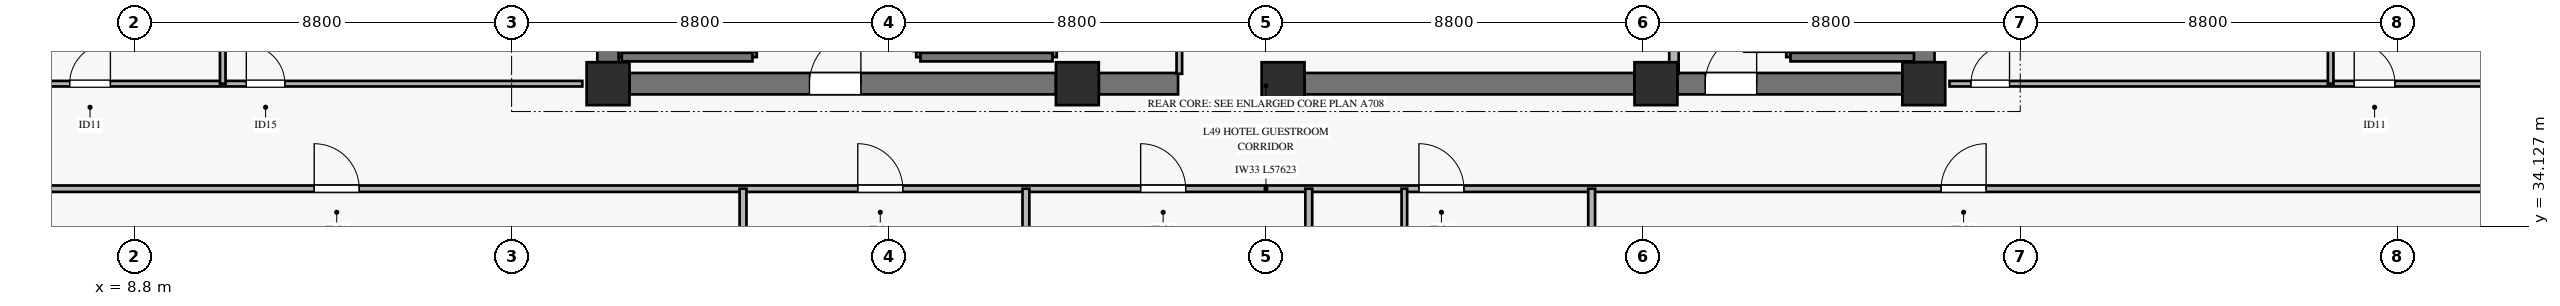
"""IFC4 building model, lengths in metres.
Left out: names, types, materials, properties, quantities, classifications, styles, units other than length and angle.
Written with IfcOpenShell. Run it as: python <this file> out.ifc"""

import sys

from ifc_helpers import new_model, si_unit, direction, frame, frame_2d, origin, origin_2d, place, context, subcontext, project, spatial, rectangle, extrude, source, transform, mapped, element, fill, save


model = new_model("IFC4")
c1 = context("Model", 3, precision=1e-05, world=origin(), true_north=direction((0.0, 1.0)))
c2 = subcontext(c1, "Body", "Model", "MODEL_VIEW")
j1 = project(units=[si_unit("LENGTHUNIT", "METRE"), si_unit("PLANEANGLEUNIT", "RADIAN")], contexts=[c1])
p1 = place(None, origin())
s1 = spatial("IfcSite", under=j1, at=p1, CompositionType="ELEMENT")
p2 = place(p1, origin())
s2 = spatial("IfcBuilding", under=s1, at=p2, CompositionType="ELEMENT")
p3 = place(p2, frame((0.0, 0.0, 195.7)))
s3 = spatial("IfcBuildingStorey", under=s2, at=p3, CompositionType="ELEMENT", Elevation=195.7)
m1 = source(origin(), c2, "Body", "SweptSolid", [
    extrude(rectangle(XDim=1.0, YDim=1.0, at=origin_2d()), origin(), (0.0, 0.0, 1.0), 3.27),
])
for number, where, z_axis, x_axis in (
    (1, (19.85, 37.45, 0.0), (0.0, 0.0, 1.0), (1.0, 0.0, 0.0)),
    (2, (30.8, 37.45, 0.0), (0.0, 0.0, 1.0), (1.0, 0.0, 0.0)),
    (3, (35.6, 37.45, 0.0), (0.0, 0.0, 1.0), (1.0, 0.0, 0.0)),
    (4, (44.3, 37.45, 0.0), (0.0, 0.0, 1.0), (1.0, 0.0, 0.0)),
    (5, (50.55, 37.45, 0.0), (0.0, 0.0, 1.0), (1.0, 0.0, 0.0)),
):
    element("IfcColumn", number, at=place(p3, frame(where, z_axis=z_axis, x_axis=x_axis)), inside=s3, PredefinedType="PILASTER", context=c2, shape_type="MappedRepresentation", body=[
        mapped(m1, transform((0.0, 0.0, 0.0), x_axis=(1.0, 0.0, 0.0), y_axis=(0.0, 1.0, 0.0), z_axis=(0.0, 0.0, 1.0), scale=1.0)),
    ])
p4 = place(p3, frame((20.35, 37.45, 0.0), z_axis=(0.0, 0.0, 1.0), x_axis=(1.0, 0.0, 0.0)))
e6 = element("IfcWall", 6, at=p4, inside=s3, PredefinedType="SHEAR", context=c2, shape_type="SweptSolid", body=[
    extrude(rectangle(XDim=9.95, YDim=0.5, at=frame_2d((4.975, 0.0))), origin(), (0.0, 0.0, 1.0), 3.27),
])
p5 = place(p4, frame((4.2, 0.0, 0.0)))
e7 = element("IfcOpeningElement", 7, at=p5, cuts=e6, PredefinedType="OPENING", context=c2, shape_type="SweptSolid", body=[
    extrude(rectangle(XDim=1.2, YDim=2.15, at=frame_2d((0.6, 1.075))), frame((0.0, 0.26, 0.0), z_axis=(0.0, -1.0, 0.0), x_axis=(1.0, 0.0, 0.0)), (0.0, 0.0, 1.0), 0.52),
])
p6 = place(p3, frame((31.3, 37.45, 0.0), z_axis=(0.0, 0.0, 1.0), x_axis=(1.0, 0.0, 0.0)))
e8 = element("IfcWall", 8, at=p6, inside=s3, PredefinedType="SHEAR", context=c2, shape_type="SweptSolid", body=[
    extrude(rectangle(XDim=1.85, YDim=0.5, at=frame_2d((0.925, 0.0))), origin(), (0.0, 0.0, 1.0), 3.27),
])
p7 = place(p3, frame((36.1, 37.45, 0.0), z_axis=(0.0, 0.0, 1.0), x_axis=(1.0, 0.0, 0.0)))
e9 = element("IfcWall", 9, at=p7, inside=s3, PredefinedType="SHEAR", context=c2, shape_type="SweptSolid", body=[
    extrude(rectangle(XDim=7.7, YDim=0.5, at=frame_2d((3.85, 0.0))), origin(), (0.0, 0.0, 1.0), 3.27),
])
p8 = place(p3, frame((44.8, 37.45, 0.0), z_axis=(0.0, 0.0, 1.0), x_axis=(1.0, 0.0, 0.0)))
e10 = element("IfcWall", 10, at=p8, inside=s3, PredefinedType="SHEAR", context=c2, shape_type="SweptSolid", body=[
    extrude(rectangle(XDim=5.25, YDim=0.5, at=frame_2d((2.625, 0.0))), origin(), (0.0, 0.0, 1.0), 3.27),
])
p9 = place(p8, frame((0.65, 0.0, 0.0)))
e11 = element("IfcOpeningElement", 11, at=p9, cuts=e10, PredefinedType="OPENING", context=c2, shape_type="SweptSolid", body=[
    extrude(rectangle(XDim=1.2, YDim=2.15, at=frame_2d((0.6, 1.075))), frame((0.0, 0.26, 0.0), z_axis=(0.0, -1.0, 0.0), x_axis=(1.0, 0.0, 0.0)), (0.0, 0.0, 1.0), 0.52),
])
for number, where, z_axis, x_axis in (
    (12, (19.85, 37.95, 0.0), (0.0, 0.0, 1.0), (0.0, 1.0, 0.0)),
    (13, (50.55, 37.95, 0.0), (0.0, 0.0, 1.0), (0.0, 1.0, 0.0)),
):
    element("IfcWall", number, at=place(p3, frame(where, z_axis=z_axis, x_axis=x_axis)), inside=s3, PredefinedType="SHEAR", context=c2, shape_type="SweptSolid", body=[
        extrude(rectangle(XDim=8.1, YDim=0.5, at=frame_2d((4.05, 0.0))), origin(), (0.0, 0.0, 1.0), 3.27),
    ])
p10 = place(p3, frame((20.17, 38.07, 0.0), z_axis=(0.0, 0.0, 1.0), x_axis=(0.0, 1.0, 0.0)))
e14 = element("IfcWall", 14, at=p10, inside=s3, PredefinedType="SOLIDWALL", context=c2, shape_type="SweptSolid", body=[
    extrude(rectangle(XDim=7.25, YDim=0.14, at=frame_2d((3.625, 0.0))), origin(), (0.0, 0.0, 1.0), 3.5),
])
p11 = place(p3, frame((23.22, 38.07, 0.0), z_axis=(0.0, 0.0, 1.0), x_axis=(0.0, 1.0, 0.0)))
e15 = element("IfcWall", 15, at=p11, inside=s3, PredefinedType="SOLIDWALL", context=c2, shape_type="SweptSolid", body=[
    extrude(rectangle(XDim=7.25, YDim=0.2, at=frame_2d((3.625, 0.0))), origin(), (0.0, 0.0, 1.0), 3.5),
])
p12 = place(p11, frame((0.11, 0.0, 0.0)))
e16 = element("IfcOpeningElement", 16, at=p12, cuts=e15, PredefinedType="OPENING", context=c2, shape_type="SweptSolid", body=[
    extrude(rectangle(XDim=1.1, YDim=2.15, at=frame_2d((0.55, 1.075))), frame((0.0, 0.11, 0.0), z_axis=(0.0, -1.0, 0.0), x_axis=(1.0, 0.0, 0.0)), (0.0, 0.0, 1.0), 0.22),
])
p13 = place(p3, frame((20.17, 38.07, 0.0), z_axis=(0.0, 0.0, 1.0), x_axis=(1.0, 0.0, 0.0)))
e17 = element("IfcWall", 17, at=p13, inside=s3, PredefinedType="SOLIDWALL", context=c2, shape_type="SweptSolid", body=[
    extrude(rectangle(XDim=3.05, YDim=0.2, at=frame_2d((1.525, 0.0))), origin(), (0.0, 0.0, 1.0), 3.5),
])
p14 = place(p3, frame((27.14, 38.07, 0.0), z_axis=(0.0, 0.0, 1.0), x_axis=(0.0, 1.0, 0.0)))
e18 = element("IfcWall", 18, at=p14, inside=s3, PredefinedType="SOLIDWALL", context=c2, shape_type="SweptSolid", body=[
    extrude(rectangle(XDim=7.25, YDim=0.2, at=frame_2d((3.625, 0.0))), origin(), (0.0, 0.0, 1.0), 3.5),
])
p15 = place(p14, frame((0.11, 0.0, 0.0)))
e19 = element("IfcOpeningElement", 19, at=p15, cuts=e18, PredefinedType="OPENING", context=c2, shape_type="SweptSolid", body=[
    extrude(rectangle(XDim=1.1, YDim=2.15, at=frame_2d((0.55, 1.075))), frame((0.0, 0.11, 0.0), z_axis=(0.0, -1.0, 0.0), x_axis=(1.0, 0.0, 0.0)), (0.0, 0.0, 1.0), 0.22),
])
p16 = place(p3, frame((30.22, 38.07, 0.0), z_axis=(0.0, 0.0, 1.0), x_axis=(0.0, 1.0, 0.0)))
e20 = element("IfcWall", 20, at=p16, inside=s3, PredefinedType="SOLIDWALL", context=c2, shape_type="SweptSolid", body=[
    extrude(rectangle(XDim=7.25, YDim=0.2, at=frame_2d((3.625, 0.0))), origin(), (0.0, 0.0, 1.0), 3.5),
])
p17 = place(p3, frame((27.14, 38.07, 0.0), z_axis=(0.0, 0.0, 1.0), x_axis=(1.0, 0.0, 0.0)))
e21 = element("IfcWall", 21, at=p17, inside=s3, PredefinedType="SOLIDWALL", context=c2, shape_type="SweptSolid", body=[
    extrude(rectangle(XDim=3.08, YDim=0.2, at=frame_2d((1.54, 0.0))), origin(), (0.0, 0.0, 1.0), 3.5),
])
p18 = place(p3, frame((47.44, 38.07, 0.0), z_axis=(0.0, 0.0, 1.0), x_axis=(0.0, 1.0, 0.0)))
e22 = element("IfcWall", 22, at=p18, inside=s3, PredefinedType="SOLIDWALL", context=c2, shape_type="SweptSolid", body=[
    extrude(rectangle(XDim=7.25, YDim=0.2, at=frame_2d((3.625, 0.0))), origin(), (0.0, 0.0, 1.0), 3.5),
])
p19 = place(p18, frame((0.11, 0.0, 0.0)))
e23 = element("IfcOpeningElement", 23, at=p19, cuts=e22, PredefinedType="OPENING", context=c2, shape_type="SweptSolid", body=[
    extrude(rectangle(XDim=1.1, YDim=2.15, at=frame_2d((0.55, 1.075))), frame((0.0, 0.11, 0.0), z_axis=(0.0, -1.0, 0.0), x_axis=(1.0, 0.0, 0.0)), (0.0, 0.0, 1.0), 0.22),
])
p20 = place(p3, frame((47.44, 38.07, 0.0), z_axis=(0.0, 0.0, 1.0), x_axis=(1.0, 0.0, 0.0)))
e24 = element("IfcWall", 24, at=p20, inside=s3, PredefinedType="SOLIDWALL", context=c2, shape_type="SweptSolid", body=[
    extrude(rectangle(XDim=2.88, YDim=0.2, at=frame_2d((1.44, 0.0))), origin(), (0.0, 0.0, 1.0), 3.5),
])
p21 = place(p3, frame((44.72, 37.68, 0.0), z_axis=(0.0, 0.0, 1.0), x_axis=(0.0, 1.0, 0.0)))
e25 = element("IfcWall", 25, at=p21, inside=s3, PredefinedType="SOLIDWALL", context=c2, shape_type="SweptSolid", body=[
    extrude(rectangle(XDim=7.54, YDim=0.22, at=frame_2d((3.77, 0.0))), origin(), (0.0, 0.0, 1.0), 3.27),
])
p22 = place(p3, frame((33.18, 37.68, 0.0), z_axis=(0.0, 0.0, 1.0), x_axis=(0.0, 1.0, 0.0)))
e26 = element("IfcWall", 26, at=p22, inside=s3, PredefinedType="PARTITIONING", context=c2, shape_type="SweptSolid", body=[
    extrude(rectangle(XDim=6.47, YDim=0.13, at=frame_2d((3.235, 0.0))), origin(), (0.0, 0.0, 1.0), 2.355),
])
p23 = place(p22, frame((2.22, 0.0, 0.0)))
e27 = element("IfcOpeningElement", 27, at=p23, cuts=e26, PredefinedType="OPENING", context=c2, shape_type="SweptSolid", body=[
    extrude(rectangle(XDim=0.9, YDim=2.1, at=frame_2d((0.45, 1.05))), frame((0.0, 0.075, 0.0), z_axis=(0.0, -1.0, 0.0), x_axis=(1.0, 0.0, 0.0)), (0.0, 0.0, 1.0), 0.15),
])
p24 = place(p3, frame((6.389, 35.0, 0.0), z_axis=(0.0, 0.0, 1.0), x_axis=(1.0, 0.0, 0.0)))
e28 = element("IfcWall", 28, at=p24, inside=s3, PredefinedType="PARTITIONING", context=c2, shape_type="SweptSolid", body=[
    extrude(rectangle(XDim=57.623, YDim=0.15, at=frame_2d((28.812, 0.0))), origin(), (0.0, 0.0, 1.0), 2.455),
])
p25 = place(p24, frame((6.605, 0.0, 0.0)))
e29 = element("IfcOpeningElement", 29, at=p25, cuts=e28, PredefinedType="OPENING", context=c2, shape_type="SweptSolid", body=[
    extrude(rectangle(XDim=1.05, YDim=2.15, at=frame_2d((0.525, 1.075))), frame((0.0, 0.085, 0.0), z_axis=(0.0, -1.0, 0.0), x_axis=(1.0, 0.0, 0.0)), (0.0, 0.0, 1.0), 0.17),
])
p26 = place(p24, frame((19.288, 0.0, 0.0)))
e30 = element("IfcOpeningElement", 30, at=p26, cuts=e28, PredefinedType="OPENING", context=c2, shape_type="SweptSolid", body=[
    extrude(rectangle(XDim=1.05, YDim=2.15, at=frame_2d((0.525, 1.075))), frame((0.0, 0.085, 0.0), z_axis=(0.0, -1.0, 0.0), x_axis=(1.0, 0.0, 0.0)), (0.0, 0.0, 1.0), 0.17),
])
p27 = place(p24, frame((25.888, 0.0, 0.0)))
e31 = element("IfcOpeningElement", 31, at=p27, cuts=e28, PredefinedType="OPENING", context=c2, shape_type="SweptSolid", body=[
    extrude(rectangle(XDim=1.05, YDim=2.15, at=frame_2d((0.525, 1.075))), frame((0.0, 0.085, 0.0), z_axis=(0.0, -1.0, 0.0), x_axis=(1.0, 0.0, 0.0)), (0.0, 0.0, 1.0), 0.17),
])
p28 = place(p24, frame((32.381, 0.0, 0.0)))
e32 = element("IfcOpeningElement", 32, at=p28, cuts=e28, PredefinedType="OPENING", context=c2, shape_type="SweptSolid", body=[
    extrude(rectangle(XDim=1.05, YDim=2.15, at=frame_2d((0.525, 1.075))), frame((0.0, 0.085, 0.0), z_axis=(0.0, -1.0, 0.0), x_axis=(1.0, 0.0, 0.0)), (0.0, 0.0, 1.0), 0.17),
])
p29 = place(p24, frame((44.565, 0.0, 0.0)))
e33 = element("IfcOpeningElement", 33, at=p29, cuts=e28, PredefinedType="OPENING", context=c2, shape_type="SweptSolid", body=[
    extrude(rectangle(XDim=1.05, YDim=2.15, at=frame_2d((0.525, 1.075))), frame((0.0, 0.085, 0.0), z_axis=(0.0, -1.0, 0.0), x_axis=(1.0, 0.0, 0.0)), (0.0, 0.0, 1.0), 0.17),
])
for number, where, z_axis, x_axis in (
    (34, (23.0, 10.68, 0.0), (0.0, 0.0, 1.0), (0.0, 1.0, 0.0)),
    (35, (29.6, 10.68, 0.0), (0.0, 0.0, 1.0), (0.0, 1.0, 0.0)),
    (36, (36.2, 10.68, 0.0), (0.0, 0.0, 1.0), (0.0, 1.0, 0.0)),
):
    element("IfcWall", number, at=place(p3, frame(where, z_axis=z_axis, x_axis=x_axis)), inside=s3, PredefinedType="PARTITIONING", context=c2, shape_type="SweptSolid", body=[
        extrude(rectangle(XDim=24.32, YDim=0.16, at=frame_2d((12.16, 0.0))), origin(), (0.0, 0.0, 1.0), 2.755),
    ])
p30 = place(p3, frame((38.43, 32.45, 0.0), z_axis=(0.0, 0.0, 1.0), x_axis=(0.0, 1.0, 0.0)))
e37 = element("IfcWall", 37, at=p30, inside=s3, PredefinedType="PARTITIONING", context=c2, shape_type="SweptSolid", body=[
    extrude(rectangle(XDim=2.55, YDim=0.13, at=frame_2d((1.275, 0.0))), origin(), (0.0, 0.0, 1.0), 2.805),
])
p31 = place(p3, frame((42.8, 10.68, 0.0), z_axis=(0.0, 0.0, 1.0), x_axis=(0.0, 1.0, 0.0)))
e38 = element("IfcWall", 38, at=p31, inside=s3, PredefinedType="PARTITIONING", context=c2, shape_type="SweptSolid", body=[
    extrude(rectangle(XDim=24.32, YDim=0.16, at=frame_2d((12.16, 0.0))), origin(), (0.0, 0.0, 1.0), 2.755),
])
p32 = place(p3, frame((6.389, 37.45, 0.0), z_axis=(0.0, 0.0, 1.0), x_axis=(1.0, 0.0, 0.0)))
e39 = element("IfcWall", 39, at=p32, inside=s3, PredefinedType="PARTITIONING", context=c2, shape_type="SweptSolid", body=[
    extrude(rectangle(XDim=12.861, YDim=0.13, at=frame_2d((6.431, 0.0))), origin(), (0.0, 0.0, 1.0), 2.755),
])
p33 = place(p32, frame((0.9, 0.0, 0.0)))
e40 = element("IfcOpeningElement", 40, at=p33, cuts=e39, PredefinedType="OPENING", context=c2, shape_type="SweptSolid", body=[
    extrude(rectangle(XDim=0.95, YDim=2.1, at=frame_2d((0.475, 1.05))), frame((0.0, 0.075, 0.0), z_axis=(0.0, -1.0, 0.0), x_axis=(1.0, 0.0, 0.0)), (0.0, 0.0, 1.0), 0.15),
])
p34 = place(p32, frame((5.021, 0.0, 0.0)))
e41 = element("IfcOpeningElement", 41, at=p34, cuts=e39, PredefinedType="OPENING", context=c2, shape_type="SweptSolid", body=[
    extrude(rectangle(XDim=0.9, YDim=2.1, at=frame_2d((0.45, 1.05))), frame((0.0, 0.075, 0.0), z_axis=(0.0, -1.0, 0.0), x_axis=(1.0, 0.0, 0.0)), (0.0, 0.0, 1.0), 0.15),
])
p35 = place(p3, frame((10.86, 37.45, 0.0), z_axis=(0.0, 0.0, 1.0), x_axis=(0.0, 1.0, 0.0)))
e42 = element("IfcWall", 42, at=p35, inside=s3, PredefinedType="PARTITIONING", context=c2, shape_type="SweptSolid", body=[
    extrude(rectangle(XDim=8.8, YDim=0.13, at=frame_2d((4.4, 0.0))), origin(), (0.0, 0.0, 1.0), 3.27),
])
p36 = place(p3, frame((51.15, 37.45, 0.0), z_axis=(0.0, 0.0, 1.0), x_axis=(1.0, 0.0, 0.0)))
e43 = element("IfcWall", 43, at=p36, inside=s3, PredefinedType="PARTITIONING", context=c2, shape_type="SweptSolid", body=[
    extrude(rectangle(XDim=12.862, YDim=0.13, at=frame_2d((6.431, 0.0))), origin(), (0.0, 0.0, 1.0), 2.755),
])
p37 = place(p36, frame((0.5, 0.0, 0.0)))
e44 = element("IfcOpeningElement", 44, at=p37, cuts=e43, PredefinedType="OPENING", context=c2, shape_type="SweptSolid", body=[
    extrude(rectangle(XDim=0.9, YDim=2.1, at=frame_2d((0.45, 1.05))), frame((0.0, 0.075, 0.0), z_axis=(0.0, -1.0, 0.0), x_axis=(1.0, 0.0, 0.0)), (0.0, 0.0, 1.0), 0.15),
])
p38 = place(p36, frame((9.443, 0.0, 0.0)))
e45 = element("IfcOpeningElement", 45, at=p38, cuts=e43, PredefinedType="OPENING", context=c2, shape_type="SweptSolid", body=[
    extrude(rectangle(XDim=0.95, YDim=2.1, at=frame_2d((0.475, 1.05))), frame((0.0, 0.075, 0.0), z_axis=(0.0, -1.0, 0.0), x_axis=(1.0, 0.0, 0.0)), (0.0, 0.0, 1.0), 0.15),
])
p39 = place(p3, frame((60.043, 37.45, 0.0), z_axis=(0.0, 0.0, 1.0), x_axis=(0.0, 1.0, 0.0)))
e46 = element("IfcWall", 46, at=p39, inside=s3, PredefinedType="PARTITIONING", context=c2, shape_type="SweptSolid", body=[
    extrude(rectangle(XDim=8.8, YDim=0.13, at=frame_2d((4.4, 0.0))), origin(), (0.0, 0.0, 1.0), 2.755),
])
m2 = source(origin(), c2, "Body", "SweptSolid", [
    extrude(rectangle(XDim=1.2, YDim=2.15, at=frame_2d((0.6, 1.075))), frame((0.0, 0.025, 0.0), z_axis=(0.0, -1.0, 0.0), x_axis=(1.0, 0.0, 0.0)), (0.0, 0.0, 1.0), 0.05),
])
p40 = place(p5, origin())
e47 = element("IfcDoor", 47, at=p40, inside=s3, OperationType="SINGLE_SWING_RIGHT", PredefinedType="DOOR", context=c2, shape_type="MappedRepresentation", body=[
    mapped(m2, transform((0.0, 0.0, 0.0), x_axis=(1.0, 0.0, 0.0), y_axis=(0.0, 1.0, 0.0), z_axis=(0.0, 0.0, 1.0), scale=1.0)),
])
fill(e7, e47)
p41 = place(p9, origin())
e48 = element("IfcDoor", 48, at=p41, inside=s3, OperationType="SINGLE_SWING_RIGHT", PredefinedType="DOOR", context=c2, shape_type="MappedRepresentation", body=[
    mapped(m2, transform((0.0, 0.0, 0.0), x_axis=(1.0, 0.0, 0.0), y_axis=(0.0, 1.0, 0.0), z_axis=(0.0, 0.0, 1.0), scale=1.0)),
])
fill(e11, e48)
m3 = source(origin(), c2, "Body", "SweptSolid", [
    extrude(rectangle(XDim=1.05, YDim=2.15, at=frame_2d((0.525, 1.075))), frame((0.0, 0.025, 0.0), z_axis=(0.0, -1.0, 0.0), x_axis=(1.0, 0.0, 0.0)), (0.0, 0.0, 1.0), 0.05),
])
p42 = place(p25, origin())
e49 = element("IfcDoor", 49, at=p42, inside=s3, OperationType="SINGLE_SWING_LEFT", PredefinedType="DOOR", context=c2, shape_type="MappedRepresentation", body=[
    mapped(m3, transform((0.0, 0.0, 0.0), x_axis=(1.0, 0.0, 0.0), y_axis=(0.0, 1.0, 0.0), z_axis=(0.0, 0.0, 1.0), scale=1.0)),
])
fill(e29, e49)
p43 = place(p26, origin())
e50 = element("IfcDoor", 50, at=p43, inside=s3, OperationType="SINGLE_SWING_LEFT", PredefinedType="DOOR", context=c2, shape_type="MappedRepresentation", body=[
    mapped(m3, transform((0.0, 0.0, 0.0), x_axis=(1.0, 0.0, 0.0), y_axis=(0.0, 1.0, 0.0), z_axis=(0.0, 0.0, 1.0), scale=1.0)),
])
fill(e30, e50)
p44 = place(p27, origin())
e51 = element("IfcDoor", 51, at=p44, inside=s3, OperationType="SINGLE_SWING_LEFT", PredefinedType="DOOR", context=c2, shape_type="MappedRepresentation", body=[
    mapped(m3, transform((0.0, 0.0, 0.0), x_axis=(1.0, 0.0, 0.0), y_axis=(0.0, 1.0, 0.0), z_axis=(0.0, 0.0, 1.0), scale=1.0)),
])
fill(e31, e51)
p45 = place(p28, origin())
e52 = element("IfcDoor", 52, at=p45, inside=s3, OperationType="SINGLE_SWING_LEFT", PredefinedType="DOOR", context=c2, shape_type="MappedRepresentation", body=[
    mapped(m3, transform((0.0, 0.0, 0.0), x_axis=(1.0, 0.0, 0.0), y_axis=(0.0, 1.0, 0.0), z_axis=(0.0, 0.0, 1.0), scale=1.0)),
])
fill(e32, e52)
p46 = place(p29, origin())
e53 = element("IfcDoor", 53, at=p46, inside=s3, OperationType="SINGLE_SWING_RIGHT", PredefinedType="DOOR", context=c2, shape_type="MappedRepresentation", body=[
    mapped(m3, transform((0.0, 0.0, 0.0), x_axis=(1.0, 0.0, 0.0), y_axis=(0.0, 1.0, 0.0), z_axis=(0.0, 0.0, 1.0), scale=1.0)),
])
fill(e33, e53)
m4 = source(origin(), c2, "Body", "SweptSolid", [
    extrude(rectangle(XDim=0.95, YDim=2.1, at=frame_2d((0.475, 1.05))), frame((0.0, 0.025, 0.0), z_axis=(0.0, -1.0, 0.0), x_axis=(1.0, 0.0, 0.0)), (0.0, 0.0, 1.0), 0.05),
])
p47 = place(p33, origin())
e54 = element("IfcDoor", 54, at=p47, inside=s3, OperationType="SINGLE_SWING_RIGHT", PredefinedType="DOOR", context=c2, shape_type="MappedRepresentation", body=[
    mapped(m4, transform((0.0, 0.0, 0.0), x_axis=(1.0, 0.0, 0.0), y_axis=(0.0, 1.0, 0.0), z_axis=(0.0, 0.0, 1.0), scale=1.0)),
])
fill(e40, e54)
m5 = source(origin(), c2, "Body", "SweptSolid", [
    extrude(rectangle(XDim=0.9, YDim=2.1, at=frame_2d((0.45, 1.05))), frame((0.0, 0.025, 0.0), z_axis=(0.0, -1.0, 0.0), x_axis=(1.0, 0.0, 0.0)), (0.0, 0.0, 1.0), 0.05),
])
p48 = place(p34, origin())
e55 = element("IfcDoor", 55, at=p48, inside=s3, OperationType="SINGLE_SWING_LEFT", PredefinedType="DOOR", context=c2, shape_type="MappedRepresentation", body=[
    mapped(m5, transform((0.0, 0.0, 0.0), x_axis=(1.0, 0.0, 0.0), y_axis=(0.0, 1.0, 0.0), z_axis=(0.0, 0.0, 1.0), scale=1.0)),
])
fill(e41, e55)
p49 = place(p37, origin())
e56 = element("IfcDoor", 56, at=p49, inside=s3, OperationType="SINGLE_SWING_RIGHT", PredefinedType="DOOR", context=c2, shape_type="MappedRepresentation", body=[
    mapped(m5, transform((0.0, 0.0, 0.0), x_axis=(1.0, 0.0, 0.0), y_axis=(0.0, 1.0, 0.0), z_axis=(0.0, 0.0, 1.0), scale=1.0)),
])
fill(e44, e56)
p50 = place(p38, origin())
e57 = element("IfcDoor", 57, at=p50, inside=s3, OperationType="SINGLE_SWING_LEFT", PredefinedType="DOOR", context=c2, shape_type="MappedRepresentation", body=[
    mapped(m4, transform((0.0, 0.0, 0.0), x_axis=(1.0, 0.0, 0.0), y_axis=(0.0, 1.0, 0.0), z_axis=(0.0, 0.0, 1.0), scale=1.0)),
])
fill(e45, e57)
save(model, sys.argv[1])
